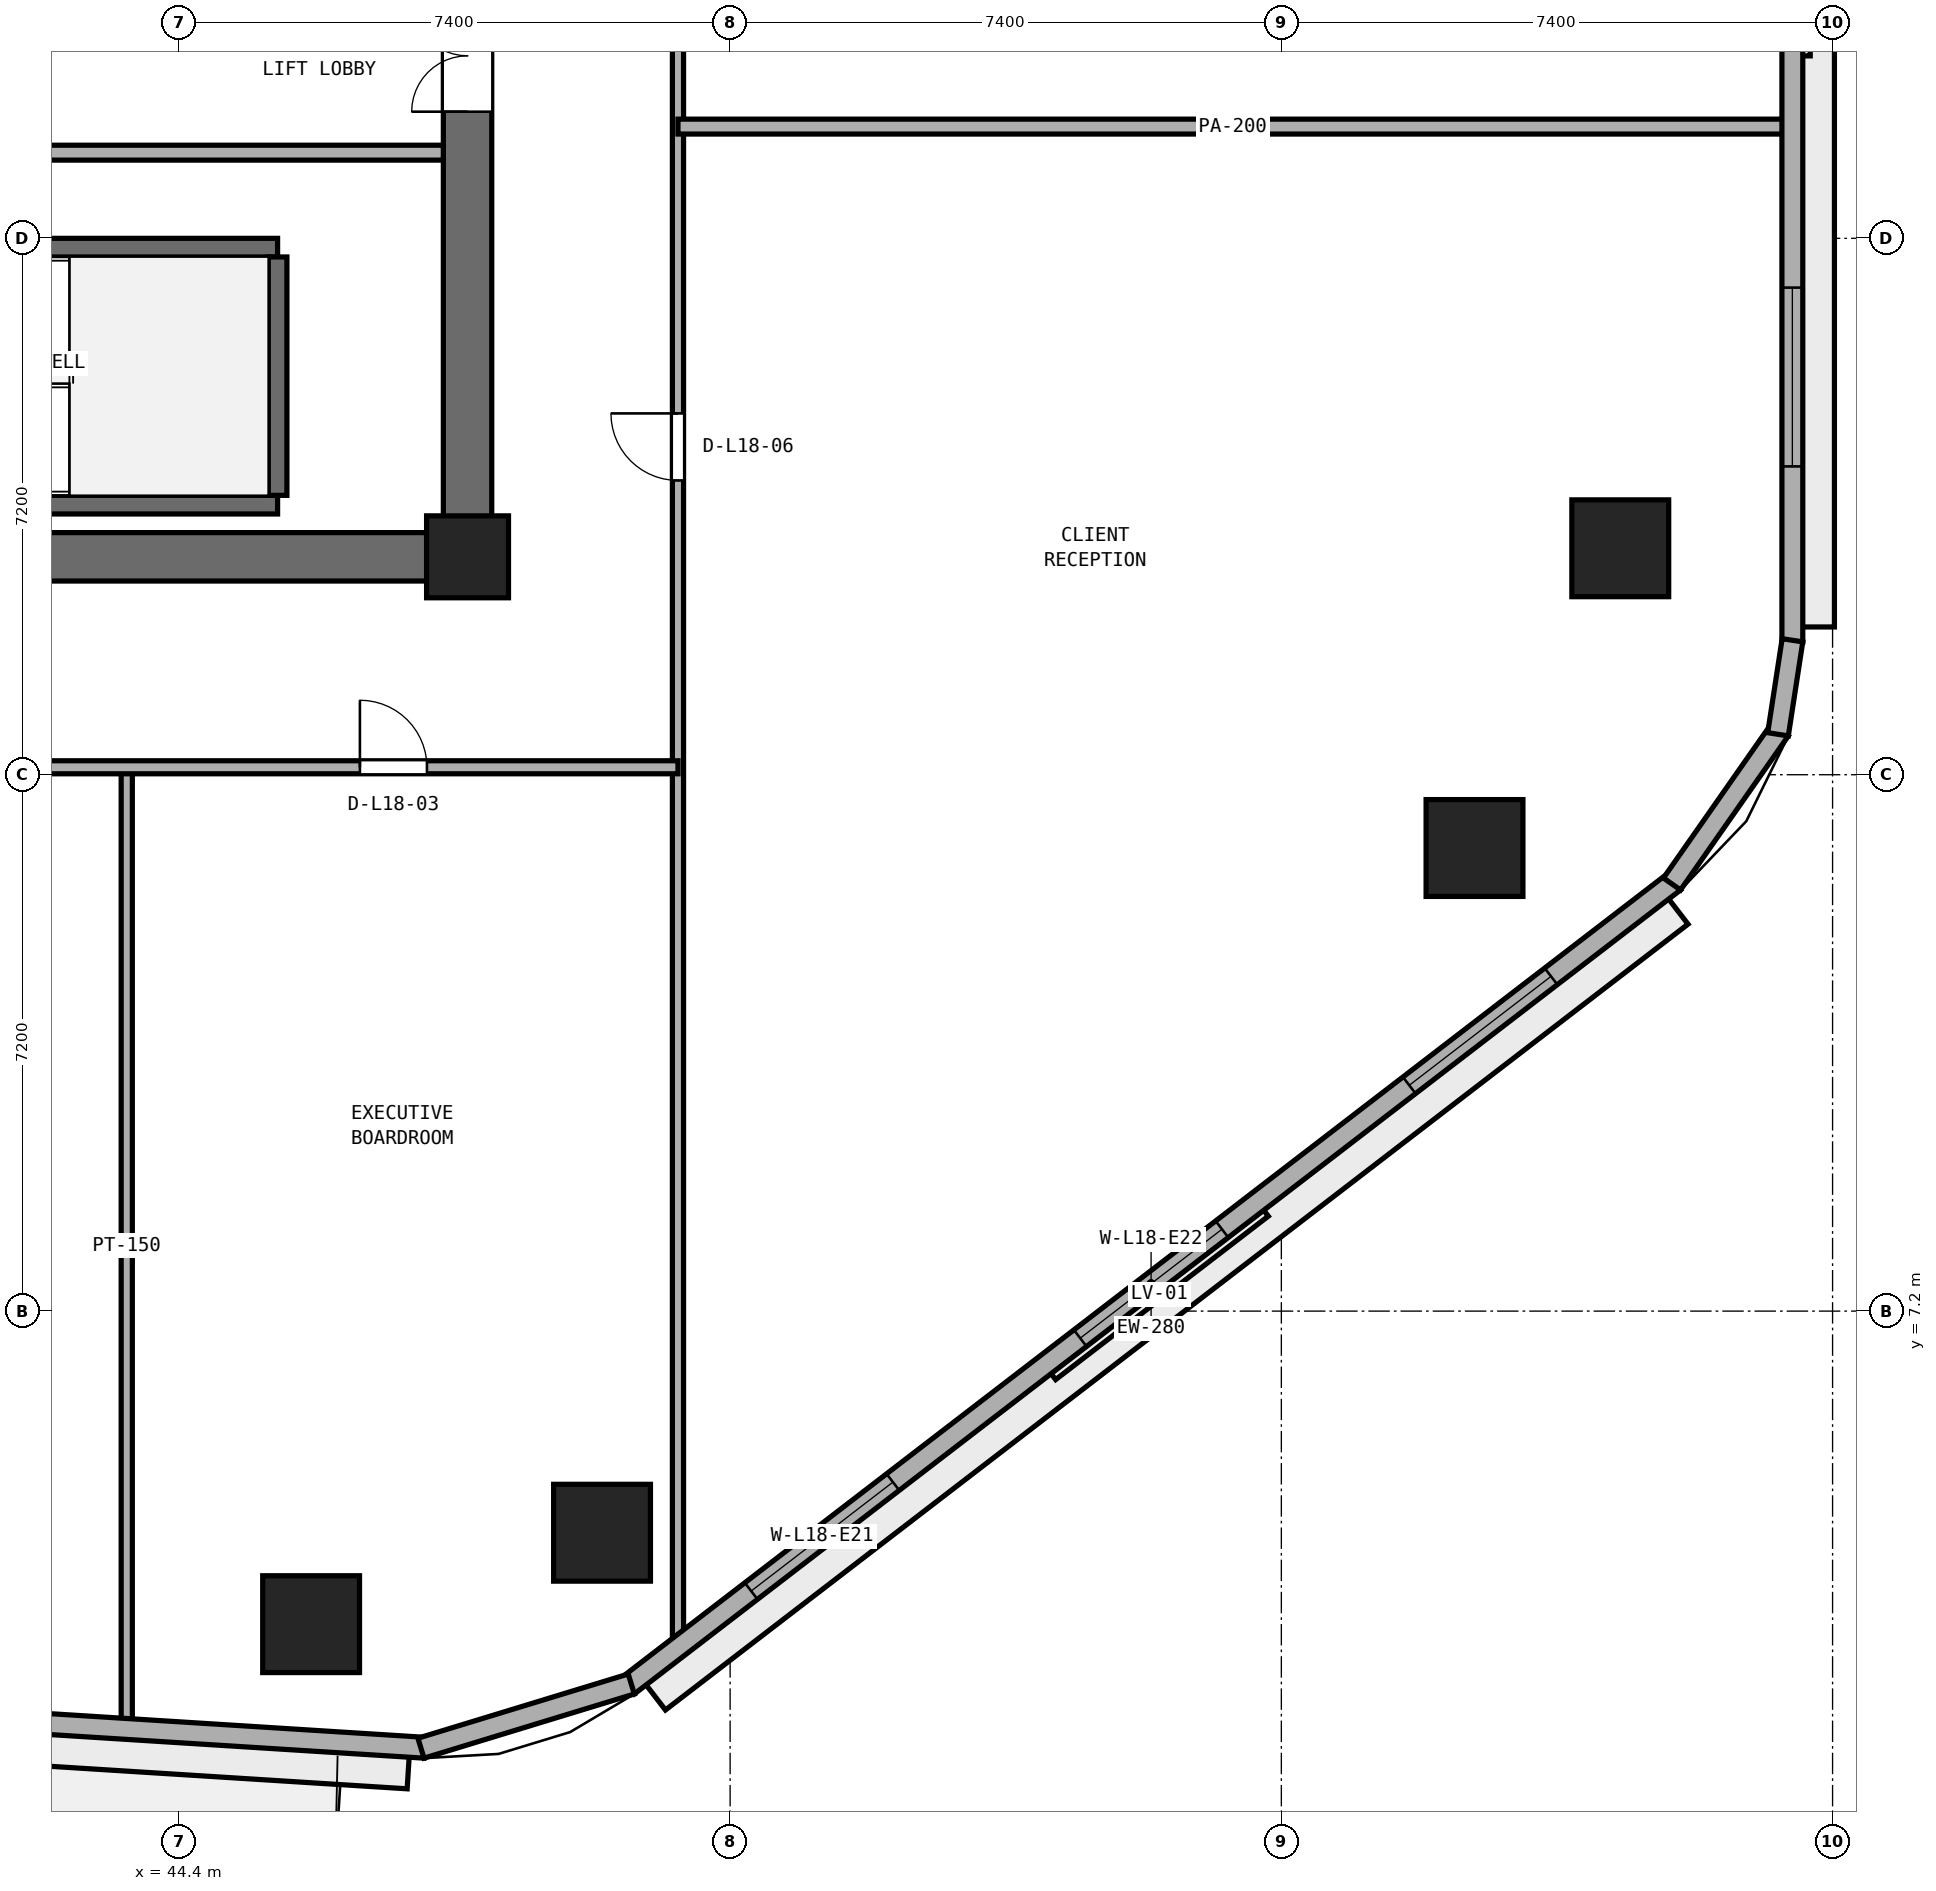
"""IFC4 building model, lengths in metres.
Left out: names, types, materials, properties, quantities, classifications, styles, units other than length and angle.
Written with IfcOpenShell. Run it as: python <this file> out.ifc"""

import sys

from ifc_helpers import new_model, si_unit, direction, frame, frame_2d, origin, origin_2d, place, context, subcontext, project, spatial, rectangle, extrude, element, fill, save


model = new_model("IFC4")
c1 = context("Model", 3, precision=1e-05, world=origin(), true_north=direction((0.0, 1.0)))
c2 = subcontext(c1, "Body", "Model", "MODEL_VIEW")
j1 = project(units=[si_unit("LENGTHUNIT", "METRE"), si_unit("PLANEANGLEUNIT", "RADIAN")], contexts=[c1])
p1 = place(None, origin())
s1 = spatial("IfcSite", under=j1, at=p1, CompositionType="ELEMENT")
p2 = place(p1, origin())
s2 = spatial("IfcBuilding", under=s1, at=p2, CompositionType="ELEMENT")
p3 = place(p2, frame((0.0, 0.0, 74.4)))
s3 = spatial("IfcBuildingStorey", under=s2, at=p3, CompositionType="ELEMENT", Elevation=74.4)
p4 = place(p3, frame((25.4, 17.325, 0.0), z_axis=(0.0, 0.0, 1.0), x_axis=(1.0, 0.0, 0.0)))
e1 = element("IfcWall", 1, at=p4, inside=s3, PredefinedType="SHEAR", context=c2, shape_type="SweptSolid", body=[
    extrude(rectangle(XDim=23.2, YDim=0.65, at=frame_2d((11.6, 0.0))), origin(), (0.0, 0.0, 1.0), 3.525),
])
p5 = place(p3, frame((48.275, 17.65, 0.0), z_axis=(0.0, 0.0, 1.0), x_axis=(0.0, 1.0, 0.0)))
e2 = element("IfcWall", 2, at=p5, inside=s3, PredefinedType="SHEAR", context=c2, shape_type="SweptSolid", body=[
    extrude(rectangle(XDim=15.1, YDim=0.65, at=frame_2d((7.55, 0.0))), origin(), (0.0, 0.0, 1.0), 3.525),
])
p6 = place(p5, frame((5.65, 0.0, 0.0)))
e3 = element("IfcOpeningElement", 3, at=p6, cuts=e2, PredefinedType="OPENING", context=c2, shape_type="SweptSolid", body=[
    extrude(rectangle(XDim=1.5, YDim=2.15, at=frame_2d((0.75, 1.075))), frame((0.0, 0.335, 0.0), z_axis=(0.0, -1.0, 0.0), x_axis=(1.0, 0.0, 0.0)), (0.0, 0.0, 1.0), 0.67),
])
p7 = place(p3, frame((48.275, 17.325, 0.0), z_axis=(0.0, 0.0, 1.0), x_axis=(1.0, 0.0, 0.0)))
e4 = element("IfcColumn", 4, at=p7, inside=s3, PredefinedType="PILASTER", context=c2, shape_type="SweptSolid", body=[
    extrude(rectangle(XDim=1.1, YDim=1.1, at=origin_2d()), origin(), (0.0, 0.0, 1.0), 3.8),
])
for number, where, z_axis, x_axis in (
    (5, (46.175, 2.998, 0.0), (0.0, 0.0, 1.0), (1.0, 0.0, 0.0)),
    (6, (50.081, 4.225, 0.0), (0.0, 0.0, 1.0), (1.0, 0.0, 0.0)),
    (7, (61.793, 13.416, 0.0), (0.0, 0.0, 1.0), (1.0, 0.0, 0.0)),
    (8, (63.75, 17.44, 0.0), (0.0, 0.0, 1.0), (1.0, 0.0, 0.0)),
):
    element("IfcColumn", number, at=place(p3, frame(where, z_axis=z_axis, x_axis=x_axis)), inside=s3, PredefinedType="COLUMN", context=c2, shape_type="SweptSolid", body=[
        extrude(rectangle(XDim=1.3, YDim=1.3, at=origin_2d()), origin(), (0.0, 0.0, 1.0), 3.8),
    ])
for number, where, z_axis, x_axis in (
    (9, (38.425, 18.025, 0.0), (0.0, 0.0, 1.0), (1.0, 0.0, 0.0)),
    (10, (38.425, 21.475, 0.0), (0.0, 0.0, 1.0), (1.0, 0.0, 0.0)),
):
    element("IfcWall", number, at=place(p3, frame(where, z_axis=z_axis, x_axis=x_axis)), inside=s3, PredefinedType="SHEAR", context=c2, shape_type="SweptSolid", body=[
        extrude(rectangle(XDim=7.3, YDim=0.25, at=frame_2d((3.65, 0.0))), origin(), (0.0, 0.0, 1.0), 3.525),
    ])
p8 = place(p3, frame((45.725, 18.15, 0.0), z_axis=(0.0, 0.0, 1.0), x_axis=(0.0, 1.0, 0.0)))
e11 = element("IfcWall", 11, at=p8, inside=s3, PredefinedType="SHEAR", context=c2, shape_type="SweptSolid", body=[
    extrude(rectangle(XDim=3.2, YDim=0.25, at=frame_2d((1.6, 0.0))), origin(), (0.0, 0.0, 1.0), 3.525),
])
p9 = place(p3, frame((42.0, 22.75, 0.0), z_axis=(0.0, 0.0, 1.0), x_axis=(1.0, 0.0, 0.0)))
e12 = element("IfcWall", 12, at=p9, inside=s3, PredefinedType="SOLIDWALL", context=c2, shape_type="SweptSolid", body=[
    extrude(rectangle(XDim=5.95, YDim=0.2, at=frame_2d((2.975, 0.0))), origin(), (0.0, 0.0, 1.0), 3.525),
])
p10 = place(p3, frame((51.1, 2.651, 0.0), z_axis=(0.0, 0.0, 1.0), x_axis=(0.0, 1.0, 0.0)))
e13 = element("IfcWall", 13, at=p10, inside=s3, PredefinedType="PARTITIONING", context=c2, shape_type="SweptSolid", body=[
    extrude(rectangle(XDim=45.255, YDim=0.15, at=frame_2d((22.627, 0.0))), origin(), (0.0, 0.0, 1.0), 3.525),
])
p11 = place(p10, frame((15.699, 0.0, 0.0)))
e14 = element("IfcOpeningElement", 14, at=p11, cuts=e13, PredefinedType="OPENING", context=c2, shape_type="SweptSolid", body=[
    extrude(rectangle(XDim=0.9, YDim=2.1, at=frame_2d((0.45, 1.05))), frame((0.0, 0.085, 0.0), z_axis=(0.0, -1.0, 0.0), x_axis=(1.0, 0.0, 0.0)), (0.0, 0.0, 1.0), 0.17),
])
p12 = place(p10, frame((26.349, 0.0, 0.0)))
e15 = element("IfcOpeningElement", 15, at=p12, cuts=e13, PredefinedType="OPENING", context=c2, shape_type="SweptSolid", body=[
    extrude(rectangle(XDim=1.0, YDim=2.12, at=frame_2d((0.5, 1.06))), frame((0.0, 0.085, 0.0), z_axis=(0.0, -1.0, 0.0), x_axis=(1.0, 0.0, 0.0)), (0.0, 0.0, 1.0), 0.17),
])
p13 = place(p3, frame((43.7, 1.656, 0.0), z_axis=(0.0, 0.0, 1.0), x_axis=(0.0, 1.0, 0.0)))
e16 = element("IfcWall", 16, at=p13, inside=s3, PredefinedType="PARTITIONING", context=c2, shape_type="SweptSolid", body=[
    extrude(rectangle(XDim=12.844, YDim=0.15, at=frame_2d((6.422, 0.0))), origin(), (0.0, 0.0, 1.0), 3.525),
])
p14 = place(p3, frame((22.9, 14.5, 0.0), z_axis=(0.0, 0.0, 1.0), x_axis=(1.0, 0.0, 0.0)))
e17 = element("IfcWall", 17, at=p14, inside=s3, PredefinedType="PARTITIONING", context=c2, shape_type="SweptSolid", body=[
    extrude(rectangle(XDim=28.2, YDim=0.175, at=frame_2d((14.1, 0.0))), origin(), (0.0, 0.0, 1.0), 3.525),
])
p15 = place(p14, frame((10.07, 0.0, 0.0)))
e18 = element("IfcOpeningElement", 18, at=p15, cuts=e17, PredefinedType="OPENING", context=c2, shape_type="SweptSolid", body=[
    extrude(rectangle(XDim=0.9, YDim=2.1, at=frame_2d((0.45, 1.05))), frame((0.0, 0.097, 0.0), z_axis=(0.0, -1.0, 0.0), x_axis=(1.0, 0.0, 0.0)), (0.0, 0.0, 1.0), 0.195),
])
p16 = place(p14, frame((23.93, 0.0, 0.0)))
e19 = element("IfcOpeningElement", 19, at=p16, cuts=e17, PredefinedType="OPENING", context=c2, shape_type="SweptSolid", body=[
    extrude(rectangle(XDim=0.9, YDim=2.1, at=frame_2d((0.45, 1.05))), frame((0.0, 0.097, 0.0), z_axis=(0.0, -1.0, 0.0), x_axis=(1.0, 0.0, 0.0)), (0.0, 0.0, 1.0), 0.195),
])
p17 = place(p3, frame((51.1, 23.1, 0.0), z_axis=(0.0, 0.0, 1.0), x_axis=(1.0, 0.0, 0.0)))
e20 = element("IfcWall", 20, at=p17, inside=s3, PredefinedType="PARTITIONING", context=c2, shape_type="SweptSolid", body=[
    extrude(rectangle(XDim=14.895, YDim=0.2, at=frame_2d((7.448, 0.0))), origin(), (0.0, 0.0, 1.0), 3.525),
])
p18 = place(p3, frame((28.161, 2.571, 0.0), z_axis=(0.0, 0.0, 1.0), x_axis=(0.998017288298, -0.06294038654, 0.0)))
e21 = element("IfcWall", 21, at=p18, inside=s3, PredefinedType="STANDARD", context=c2, shape_type="SweptSolid", body=[
    extrude(rectangle(XDim=19.577, YDim=0.28, at=frame_2d((9.789, 0.0))), origin(), (0.0, 0.0, 1.0), 3.525),
])
p19 = place(p18, frame((9.239, 0.0, 0.0)))
e22 = element("IfcOpeningElement", 22, at=p19, cuts=e21, PredefinedType="OPENING", context=c2, shape_type="SweptSolid", body=[
    extrude(rectangle(XDim=1.1, YDim=2.2, at=frame_2d((0.55, 1.1))), frame((0.0, 0.15, 0.0), z_axis=(0.0, -1.0, 0.0), x_axis=(1.0, 0.0, 0.0)), (0.0, 0.0, 1.0), 0.3),
])
p20 = place(p18, frame((2.396, 0.0, 0.9)))
e23 = element("IfcOpeningElement", 23, at=p20, cuts=e21, PredefinedType="OPENING", context=c2, shape_type="SweptSolid", body=[
    extrude(rectangle(XDim=2.4, YDim=1.75, at=frame_2d((1.2, 0.875))), frame((0.0, 0.15, 0.0), z_axis=(0.0, -1.0, 0.0), x_axis=(1.0, 0.0, 0.0)), (0.0, 0.0, 1.0), 0.3),
])
p21 = place(p3, frame((50.429, 2.172, 0.0), z_axis=(0.0, 0.0, 1.0), x_axis=(0.792937466367, 0.609303023488, 0.0)))
e24 = element("IfcWall", 24, at=p21, inside=s3, PredefinedType="STANDARD", context=c2, shape_type="SweptSolid", body=[
    extrude(rectangle(XDim=17.713, YDim=0.28, at=frame_2d((8.856, 0.0))), origin(), (0.0, 0.0, 1.0), 3.525),
])
p22 = place(p21, frame((2.085, 0.0, 0.9)))
e25 = element("IfcOpeningElement", 25, at=p22, cuts=e24, PredefinedType="OPENING", context=c2, shape_type="SweptSolid", body=[
    extrude(rectangle(XDim=2.4, YDim=1.75, at=frame_2d((1.2, 0.875))), frame((0.0, 0.15, 0.0), z_axis=(0.0, -1.0, 0.0), x_axis=(1.0, 0.0, 0.0)), (0.0, 0.0, 1.0), 0.3),
])
p23 = place(p21, frame((7.656, 0.0, 0.9)))
e26 = element("IfcOpeningElement", 26, at=p23, cuts=e24, PredefinedType="OPENING", context=c2, shape_type="SweptSolid", body=[
    extrude(rectangle(XDim=2.4, YDim=1.75, at=frame_2d((1.2, 0.875))), frame((0.0, 0.15, 0.0), z_axis=(0.0, -1.0, 0.0), x_axis=(1.0, 0.0, 0.0)), (0.0, 0.0, 1.0), 0.3),
])
p24 = place(p21, frame((13.227, 0.0, 0.9)))
e27 = element("IfcOpeningElement", 27, at=p24, cuts=e24, PredefinedType="OPENING", context=c2, shape_type="SweptSolid", body=[
    extrude(rectangle(XDim=2.4, YDim=1.75, at=frame_2d((1.2, 0.875))), frame((0.0, 0.15, 0.0), z_axis=(0.0, -1.0, 0.0), x_axis=(1.0, 0.0, 0.0)), (0.0, 0.0, 1.0), 0.3),
])
p25 = place(p3, frame((66.06, 16.183, 0.0), z_axis=(0.0, 0.0, 1.0), x_axis=(0.0, 1.0, 0.0)))
e28 = element("IfcWall", 28, at=p25, inside=s3, PredefinedType="STANDARD", context=c2, shape_type="SweptSolid", body=[
    extrude(rectangle(XDim=19.331, YDim=0.28, at=frame_2d((9.666, 0.0))), origin(), (0.0, 0.0, 1.0), 3.525),
])
p26 = place(p25, frame((2.355, 0.0, 0.9)))
e29 = element("IfcOpeningElement", 29, at=p26, cuts=e28, PredefinedType="OPENING", context=c2, shape_type="SweptSolid", body=[
    extrude(rectangle(XDim=2.4, YDim=1.75, at=frame_2d((1.2, 0.875))), frame((0.0, 0.15, 0.0), z_axis=(0.0, -1.0, 0.0), x_axis=(1.0, 0.0, 0.0)), (0.0, 0.0, 1.0), 0.3),
])
p27 = place(p25, frame((8.466, 0.0, 0.9)))
e30 = element("IfcOpeningElement", 30, at=p27, cuts=e28, PredefinedType="OPENING", context=c2, shape_type="SweptSolid", body=[
    extrude(rectangle(XDim=2.4, YDim=1.75, at=frame_2d((1.2, 0.875))), frame((0.0, 0.15, 0.0), z_axis=(0.0, -1.0, 0.0), x_axis=(1.0, 0.0, 0.0)), (0.0, 0.0, 1.0), 0.3),
])
p28 = place(p25, frame((14.576, 0.0, 0.9)))
e31 = element("IfcOpeningElement", 31, at=p28, cuts=e28, PredefinedType="OPENING", context=c2, shape_type="SweptSolid", body=[
    extrude(rectangle(XDim=2.4, YDim=1.75, at=frame_2d((1.2, 0.875))), frame((0.0, 0.15, 0.0), z_axis=(0.0, -1.0, 0.0), x_axis=(1.0, 0.0, 0.0)), (0.0, 0.0, 1.0), 0.3),
])
p29 = place(p3, frame((47.65, 1.333, 0.0), z_axis=(0.0, 0.0, 1.0), x_axis=(0.956461287977, 0.291859220516, 0.0)))
e32 = element("IfcWall", 32, at=p29, inside=s3, PredefinedType="STANDARD", context=c2, shape_type="SweptSolid", body=[
    extrude(rectangle(XDim=2.952, YDim=0.28, at=frame_2d((1.476, 0.0))), origin(), (0.0, 0.0, 1.0), 3.525),
])
p30 = place(p3, frame((64.444, 12.933, 0.0), z_axis=(0.0, 0.0, 1.0), x_axis=(0.573176686443, 0.819431806875, 0.0)))
e33 = element("IfcWall", 33, at=p30, inside=s3, PredefinedType="STANDARD", context=c2, shape_type="SweptSolid", body=[
    extrude(rectangle(XDim=2.524, YDim=0.28, at=frame_2d((1.262, 0.0))), origin(), (0.0, 0.0, 1.0), 3.525),
])
p31 = place(p3, frame((65.867, 14.943, 0.0), z_axis=(0.0, 0.0, 1.0), x_axis=(0.152014078361, 0.988378328364, 0.0)))
e34 = element("IfcWall", 34, at=p31, inside=s3, PredefinedType="STANDARD", context=c2, shape_type="SweptSolid", body=[
    extrude(rectangle(XDim=1.277, YDim=0.28, at=frame_2d((0.638, 0.0))), origin(), (0.0, 0.0, 1.0), 3.525),
])
p32 = place(p6, origin())
e35 = element("IfcDoor", 35, at=p32, inside=s3, OperationType="DOUBLE_DOOR_SINGLE_SWING", PredefinedType="DOOR", context=c2, shape_type="SweptSolid", body=[
    extrude(rectangle(XDim=1.5, YDim=2.15, at=frame_2d((0.75, 1.075))), frame((0.0, 0.025, 0.0), z_axis=(0.0, -1.0, 0.0), x_axis=(1.0, 0.0, 0.0)), (0.0, 0.0, 1.0), 0.05),
])
fill(e3, e35)
p33 = place(p16, origin())
e36 = element("IfcDoor", 36, at=p33, inside=s3, OperationType="SINGLE_SWING_LEFT", PredefinedType="DOOR", context=c2, shape_type="SweptSolid", body=[
    extrude(rectangle(XDim=0.9, YDim=2.1, at=frame_2d((0.45, 1.05))), frame((0.0, 0.025, 0.0), z_axis=(0.0, -1.0, 0.0), x_axis=(1.0, 0.0, 0.0)), (0.0, 0.0, 1.0), 0.05),
])
fill(e19, e36)
p34 = place(p11, origin())
e37 = element("IfcDoor", 37, at=p34, inside=s3, OperationType="SINGLE_SWING_RIGHT", PredefinedType="DOOR", context=c2, shape_type="SweptSolid", body=[
    extrude(rectangle(XDim=0.9, YDim=2.1, at=frame_2d((0.45, 1.05))), frame((0.0, 0.025, 0.0), z_axis=(0.0, -1.0, 0.0), x_axis=(1.0, 0.0, 0.0)), (0.0, 0.0, 1.0), 0.05),
])
fill(e14, e37)
p35 = place(p22, origin())
e38 = element("IfcWindow", 38, at=p35, inside=s3, PartitioningType="SINGLE_PANEL", PredefinedType="WINDOW", context=c2, shape_type="SweptSolid", body=[
    extrude(rectangle(XDim=2.4, YDim=1.75, at=frame_2d((1.2, 0.875))), frame((0.0, 0.03, 0.0), z_axis=(0.0, -1.0, 0.0), x_axis=(1.0, 0.0, 0.0)), (0.0, 0.0, 1.0), 0.06),
])
fill(e25, e38)
p36 = place(p23, origin())
e39 = element("IfcWindow", 39, at=p36, inside=s3, PartitioningType="SINGLE_PANEL", PredefinedType="WINDOW", context=c2, shape_type="SweptSolid", body=[
    extrude(rectangle(XDim=2.4, YDim=1.75, at=frame_2d((1.2, 0.875))), frame((0.0, 0.03, 0.0), z_axis=(0.0, -1.0, 0.0), x_axis=(1.0, 0.0, 0.0)), (0.0, 0.0, 1.0), 0.06),
])
fill(e26, e39)
p37 = place(p24, origin())
e40 = element("IfcWindow", 40, at=p37, inside=s3, PartitioningType="SINGLE_PANEL", PredefinedType="WINDOW", context=c2, shape_type="SweptSolid", body=[
    extrude(rectangle(XDim=2.4, YDim=1.75, at=frame_2d((1.2, 0.875))), frame((0.0, 0.03, 0.0), z_axis=(0.0, -1.0, 0.0), x_axis=(1.0, 0.0, 0.0)), (0.0, 0.0, 1.0), 0.06),
])
fill(e27, e40)
p38 = place(p26, origin())
e41 = element("IfcWindow", 41, at=p38, inside=s3, PartitioningType="SINGLE_PANEL", PredefinedType="WINDOW", context=c2, shape_type="SweptSolid", body=[
    extrude(rectangle(XDim=2.4, YDim=1.75, at=frame_2d((1.2, 0.875))), frame((0.0, 0.03, 0.0), z_axis=(0.0, -1.0, 0.0), x_axis=(1.0, 0.0, 0.0)), (0.0, 0.0, 1.0), 0.06),
])
fill(e29, e41)
save(model, sys.argv[1])
